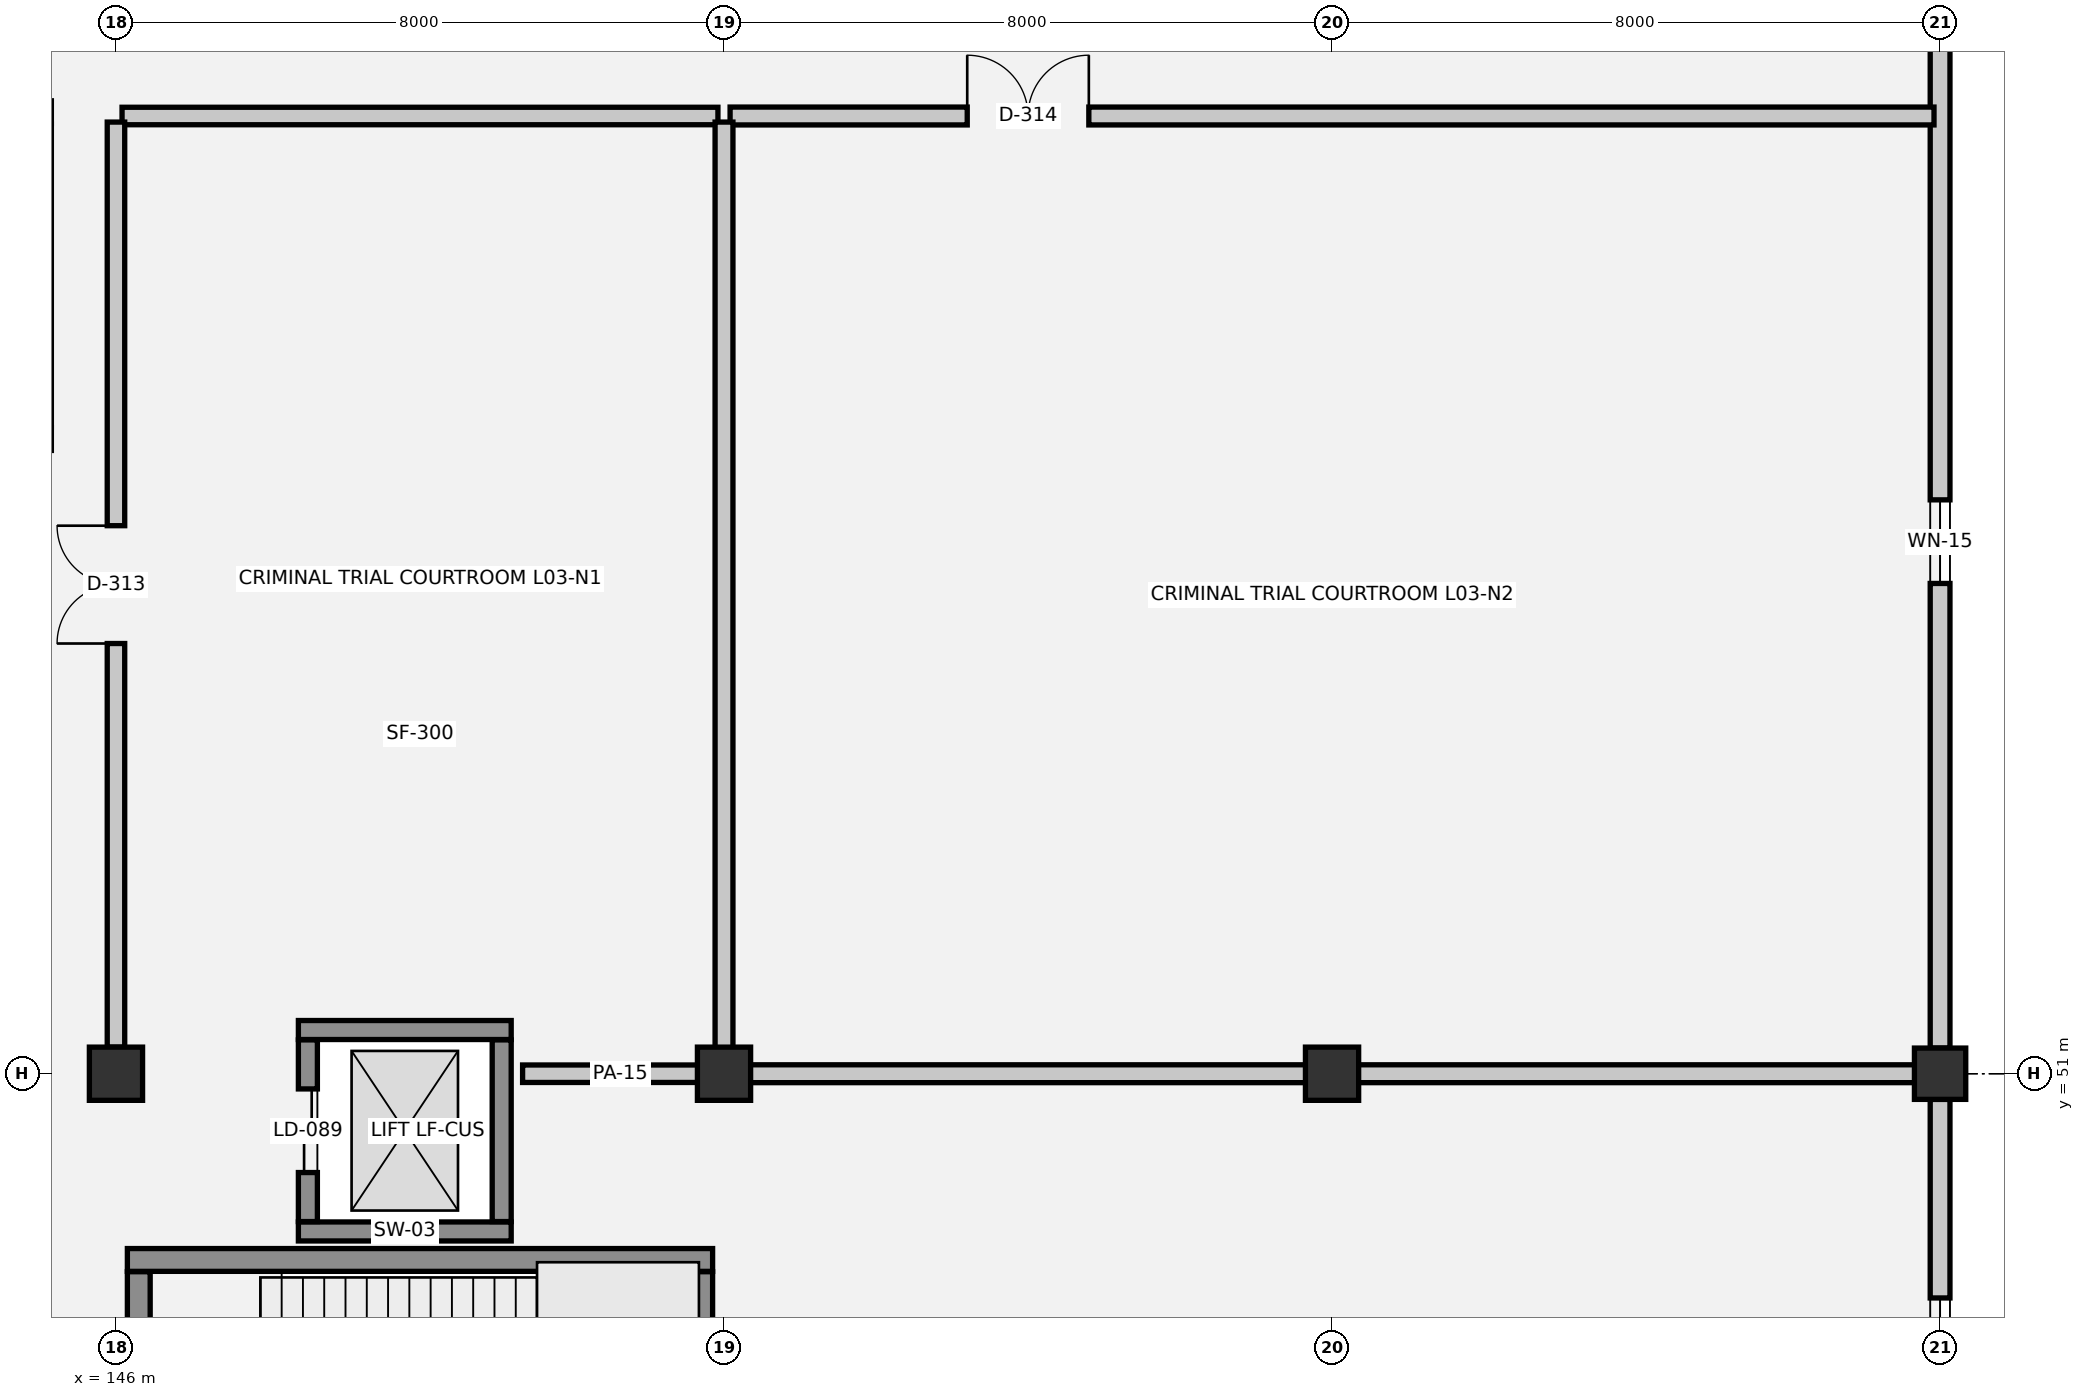
"""IFC4 building model, lengths in metres.
Left out: names, types, materials, properties, quantities, classifications, styles, units other than length and angle.
Written with IfcOpenShell. Run it as: python <this file> out.ifc"""

import sys

from ifc_helpers import new_model, si_unit, direction, frame, frame_2d, origin, origin_2d, place, context, subcontext, project, spatial, rectangle, extrude, element, fill, save


model = new_model("IFC4")
c1 = context("Model", 3, precision=1e-05, world=origin(), true_north=direction((0.0, 1.0)))
c2 = subcontext(c1, "Body", "Model", "MODEL_VIEW")
j1 = project(units=[si_unit("LENGTHUNIT", "METRE"), si_unit("PLANEANGLEUNIT", "RADIAN")], contexts=[c1])
p1 = place(None, origin())
s1 = spatial("IfcSite", under=j1, at=p1, CompositionType="ELEMENT")
p2 = place(p1, origin())
s2 = spatial("IfcBuilding", under=s1, at=p2, CompositionType="ELEMENT")
p3 = place(p2, frame((0.0, 0.0, 9.9)))
s3 = spatial("IfcBuildingStorey", under=s2, at=p3, CompositionType="ELEMENT", Elevation=9.9)
for number, where, z_axis, x_axis in (
    (1, (146.0, 51.0, 0.0), (0.0, 0.0, 1.0), (1.0, 0.0, 0.0)),
    (2, (154.0, 51.0, 0.0), (0.0, 0.0, 1.0), (1.0, 0.0, 0.0)),
    (3, (162.0, 51.0, 0.0), (0.0, 0.0, 1.0), (1.0, 0.0, 0.0)),
):
    element("IfcColumn", number, at=place(p3, frame(where, z_axis=z_axis, x_axis=x_axis)), inside=s3, PredefinedType="COLUMN", context=c2, shape_type="SweptSolid", body=[
        extrude(rectangle(XDim=0.7, YDim=0.7, at=origin_2d()), origin(), (0.0, 0.0, 1.0), 4.5),
    ])
p4 = place(p3, frame((170.0, 51.0, 0.0), z_axis=(0.0, 0.0, 1.0), x_axis=(1.0, 0.0, 0.0)))
e4 = element("IfcColumn", 4, at=p4, inside=s3, PredefinedType="COLUMN", context=c2, shape_type="SweptSolid", body=[
    extrude(rectangle(XDim=0.675, YDim=0.675, at=origin_2d()), origin(), (0.0, 0.0, 1.0), 4.5),
])
p5 = place(p3, frame((170.0, 64.663, 0.0), z_axis=(0.0, 0.0, 1.0), x_axis=(0.0, -1.0, 0.0)))
e5 = element("IfcWall", 5, at=p5, inside=s3, PredefinedType="SOLIDWALL", context=c2, shape_type="SweptSolid", body=[
    extrude(rectangle(XDim=13.325, YDim=0.26, at=frame_2d((6.663, 0.0))), origin(), (0.0, 0.0, 1.0), 3.23),
])
p6 = place(p5, frame((6.113, 0.0, 1.0)))
e6 = element("IfcOpeningElement", 6, at=p6, cuts=e5, PredefinedType="OPENING", context=c2, shape_type="SweptSolid", body=[
    extrude(rectangle(XDim=1.1, YDim=1.2, at=frame_2d((0.55, 0.6))), frame((0.0, 0.14, 0.0), z_axis=(0.0, -1.0, 0.0), x_axis=(1.0, 0.0, 0.0)), (0.0, 0.0, 1.0), 0.28),
])
p7 = place(p3, frame((170.0, 50.663, 0.0), z_axis=(0.0, 0.0, 1.0), x_axis=(0.0, -1.0, 0.0)))
e7 = element("IfcWall", 7, at=p7, inside=s3, PredefinedType="SOLIDWALL", context=c2, shape_type="SweptSolid", body=[
    extrude(rectangle(XDim=6.325, YDim=0.26, at=frame_2d((3.163, 0.0))), origin(), (0.0, 0.0, 1.0), 3.23),
])
p8 = place(p7, frame((2.613, 0.0, 1.0)))
e8 = element("IfcOpeningElement", 8, at=p8, cuts=e7, PredefinedType="OPENING", context=c2, shape_type="SweptSolid", body=[
    extrude(rectangle(XDim=1.1, YDim=1.2, at=frame_2d((0.55, 0.6))), frame((0.0, 0.14, 0.0), z_axis=(0.0, -1.0, 0.0), x_axis=(1.0, 0.0, 0.0)), (0.0, 0.0, 1.0), 0.28),
])
for number, where, z_axis, x_axis in (
    (9, (148.4, 48.925, 0.0), (0.0, 0.0, 1.0), (1.0, 0.0, 0.0)),
    (10, (151.2, 51.575, 0.0), (0.0, 0.0, 1.0), (-1.0, 0.0, 0.0)),
):
    element("IfcWall", number, at=place(p3, frame(where, z_axis=z_axis, x_axis=x_axis)), inside=s3, PredefinedType="SHEAR", context=c2, shape_type="SweptSolid", body=[
        extrude(rectangle(XDim=2.8, YDim=0.25, at=frame_2d((1.4, 0.0))), origin(), (0.0, 0.0, 1.0), 4.5),
    ])
p9 = place(p3, frame((148.525, 51.445, 0.0), z_axis=(0.0, 0.0, 1.0), x_axis=(0.0, -1.0, 0.0)))
e11 = element("IfcWall", 11, at=p9, inside=s3, PredefinedType="SHEAR", context=c2, shape_type="SweptSolid", body=[
    extrude(rectangle(XDim=2.39, YDim=0.25, at=frame_2d((1.195, 0.0))), origin(), (0.0, 0.0, 1.0), 4.5),
])
p10 = place(p9, frame((0.645, 0.0, 0.0)))
e12 = element("IfcOpeningElement", 12, at=p10, cuts=e11, PredefinedType="OPENING", context=c2, shape_type="SweptSolid", body=[
    extrude(rectangle(XDim=1.1, YDim=2.15, at=frame_2d((0.55, 1.075))), frame((0.0, 0.135, 0.0), z_axis=(0.0, -1.0, 0.0), x_axis=(1.0, 0.0, 0.0)), (0.0, 0.0, 1.0), 0.27),
])
p11 = place(p3, frame((151.075, 49.055, 0.0), z_axis=(0.0, 0.0, 1.0), x_axis=(0.0, 1.0, 0.0)))
e13 = element("IfcWall", 13, at=p11, inside=s3, PredefinedType="SHEAR", context=c2, shape_type="SweptSolid", body=[
    extrude(rectangle(XDim=2.39, YDim=0.25, at=frame_2d((1.195, 0.0))), origin(), (0.0, 0.0, 1.0), 4.5),
])
p12 = place(p3, frame((153.85, 48.55, 0.0), z_axis=(0.0, 0.0, 1.0), x_axis=(-1.0, 0.0, 0.0)))
e14 = element("IfcWall", 14, at=p12, inside=s3, PredefinedType="SHEAR", context=c2, shape_type="SweptSolid", body=[
    extrude(rectangle(XDim=7.7, YDim=0.3, at=frame_2d((3.85, 0.0))), origin(), (0.0, 0.0, 1.0), 4.2),
])
p13 = place(p3, frame((146.3, 48.395, 0.0), z_axis=(0.0, 0.0, 1.0), x_axis=(0.0, -1.0, 0.0)))
e15 = element("IfcWall", 15, at=p13, inside=s3, PredefinedType="SHEAR", context=c2, shape_type="SweptSolid", body=[
    extrude(rectangle(XDim=3.99, YDim=0.3, at=frame_2d((1.995, 0.0))), origin(), (0.0, 0.0, 1.0), 4.2),
])
p14 = place(p13, frame((1.37, 0.0, 0.0)))
e16 = element("IfcOpeningElement", 16, at=p14, cuts=e15, PredefinedType="OPENING", context=c2, shape_type="SweptSolid", body=[
    extrude(rectangle(XDim=1.25, YDim=2.15, at=frame_2d((0.625, 1.075))), frame((0.0, 0.16, 0.0), z_axis=(0.0, -1.0, 0.0), x_axis=(1.0, 0.0, 0.0)), (0.0, 0.0, 1.0), 0.32),
])
p15 = place(p3, frame((153.7, 44.405, 0.0), z_axis=(0.0, 0.0, 1.0), x_axis=(0.0, 1.0, 0.0)))
e17 = element("IfcWall", 17, at=p15, inside=s3, PredefinedType="SHEAR", context=c2, shape_type="SweptSolid", body=[
    extrude(rectangle(XDim=3.99, YDim=0.3, at=frame_2d((1.995, 0.0))), origin(), (0.0, 0.0, 1.0), 4.2),
])
p16 = place(p3, frame((151.35, 51.0, 0.0), z_axis=(0.0, 0.0, 1.0), x_axis=(1.0, 0.0, 0.0)))
e18 = element("IfcWall", 18, at=p16, inside=s3, PredefinedType="PARTITIONING", context=c2, shape_type="SweptSolid", body=[
    extrude(rectangle(XDim=2.57, YDim=0.23, at=frame_2d((1.285, 0.0))), origin(), (0.0, 0.0, 1.0), 3.45),
])
p17 = place(p3, frame((154.08, 51.0, 0.0), z_axis=(0.0, 0.0, 1.0), x_axis=(1.0, 0.0, 0.0)))
e19 = element("IfcWall", 19, at=p17, inside=s3, PredefinedType="PARTITIONING", context=c2, shape_type="SweptSolid", body=[
    extrude(rectangle(XDim=15.84, YDim=0.235, at=frame_2d((7.92, 0.0))), origin(), (0.0, 0.0, 1.0), 3.45),
])
p18 = place(p3, frame((146.08, 63.6, 0.0), z_axis=(0.0, 0.0, 1.0), x_axis=(1.0, 0.0, 0.0)))
e20 = element("IfcWall", 20, at=p18, inside=s3, PredefinedType="PARTITIONING", context=c2, shape_type="SweptSolid", body=[
    extrude(rectangle(XDim=7.84, YDim=0.23, at=frame_2d((3.92, 0.0))), origin(), (0.0, 0.0, 1.0), 4.14),
])
p19 = place(p3, frame((154.08, 63.6, 0.0), z_axis=(0.0, 0.0, 1.0), x_axis=(1.0, 0.0, 0.0)))
e21 = element("IfcWall", 21, at=p19, inside=s3, PredefinedType="PARTITIONING", context=c2, shape_type="SweptSolid", body=[
    extrude(rectangle(XDim=15.84, YDim=0.235, at=frame_2d((7.92, 0.0))), origin(), (0.0, 0.0, 1.0), 4.14),
])
p20 = place(p19, frame((3.12, 0.0, 0.0)))
e22 = element("IfcOpeningElement", 22, at=p20, cuts=e21, PredefinedType="OPENING", context=c2, shape_type="SweptSolid", body=[
    extrude(rectangle(XDim=1.6, YDim=2.25, at=frame_2d((0.8, 1.125))), frame((0.0, 0.127, 0.0), z_axis=(0.0, -1.0, 0.0), x_axis=(1.0, 0.0, 0.0)), (0.0, 0.0, 1.0), 0.255),
])
p21 = place(p3, frame((146.0, 51.35, 0.0), z_axis=(0.0, 0.0, 1.0), x_axis=(0.0, 1.0, 0.0)))
e23 = element("IfcWall", 23, at=p21, inside=s3, PredefinedType="PARTITIONING", context=c2, shape_type="SweptSolid", body=[
    extrude(rectangle(XDim=12.17, YDim=0.23, at=frame_2d((6.085, 0.0))), origin(), (0.0, 0.0, 1.0), 3.25),
])
p22 = place(p21, frame((5.31, 0.0, 0.0)))
e24 = element("IfcOpeningElement", 24, at=p22, cuts=e23, PredefinedType="OPENING", context=c2, shape_type="SweptSolid", body=[
    extrude(rectangle(XDim=1.55, YDim=2.25, at=frame_2d((0.775, 1.125))), frame((0.0, 0.125, 0.0), z_axis=(0.0, -1.0, 0.0), x_axis=(1.0, 0.0, 0.0)), (0.0, 0.0, 1.0), 0.25),
])
p23 = place(p3, frame((154.0, 51.08, 0.0), z_axis=(0.0, 0.0, 1.0), x_axis=(0.0, 1.0, 0.0)))
e25 = element("IfcWall", 25, at=p23, inside=s3, PredefinedType="PARTITIONING", context=c2, shape_type="SweptSolid", body=[
    extrude(rectangle(XDim=12.44, YDim=0.235, at=frame_2d((6.22, 0.0))), origin(), (0.0, 0.0, 1.0), 3.25),
])
p24 = place(p6, origin())
e26 = element("IfcWindow", 26, at=p24, inside=s3, PartitioningType="SINGLE_PANEL", PredefinedType="WINDOW", context=c2, shape_type="SweptSolid", body=[
    extrude(rectangle(XDim=1.1, YDim=1.2, at=frame_2d((0.55, 0.6))), frame((0.0, 0.03, 0.0), z_axis=(0.0, -1.0, 0.0), x_axis=(1.0, 0.0, 0.0)), (0.0, 0.0, 1.0), 0.06),
])
fill(e6, e26)
p25 = place(p8, origin())
e27 = element("IfcWindow", 27, at=p25, inside=s3, PartitioningType="SINGLE_PANEL", PredefinedType="WINDOW", context=c2, shape_type="SweptSolid", body=[
    extrude(rectangle(XDim=1.1, YDim=1.2, at=frame_2d((0.55, 0.6))), frame((0.0, 0.03, 0.0), z_axis=(0.0, -1.0, 0.0), x_axis=(1.0, 0.0, 0.0)), (0.0, 0.0, 1.0), 0.06),
])
fill(e8, e27)
p26 = place(p10, origin())
e28 = element("IfcDoor", 28, at=p26, inside=s3, OperationType="DOUBLE_DOOR_SLIDING", PredefinedType="DOOR", context=c2, shape_type="SweptSolid", body=[
    extrude(rectangle(XDim=1.1, YDim=2.15, at=frame_2d((0.55, 1.075))), frame((0.0, 0.025, 0.0), z_axis=(0.0, -1.0, 0.0), x_axis=(1.0, 0.0, 0.0)), (0.0, 0.0, 1.0), 0.05),
])
fill(e12, e28)
p27 = place(p22, origin())
e29 = element("IfcDoor", 29, at=p27, inside=s3, OperationType="DOUBLE_DOOR_SINGLE_SWING", PredefinedType="DOOR", context=c2, shape_type="SweptSolid", body=[
    extrude(rectangle(XDim=1.55, YDim=2.25, at=frame_2d((0.775, 1.125))), frame((0.0, 0.025, 0.0), z_axis=(0.0, -1.0, 0.0), x_axis=(1.0, 0.0, 0.0)), (0.0, 0.0, 1.0), 0.05),
])
fill(e24, e29)
p28 = place(p20, origin())
e30 = element("IfcDoor", 30, at=p28, inside=s3, OperationType="DOUBLE_DOOR_SINGLE_SWING", PredefinedType="DOOR", context=c2, shape_type="SweptSolid", body=[
    extrude(rectangle(XDim=1.6, YDim=2.25, at=frame_2d((0.8, 1.125))), frame((0.0, 0.025, 0.0), z_axis=(0.0, -1.0, 0.0), x_axis=(1.0, 0.0, 0.0)), (0.0, 0.0, 1.0), 0.05),
])
fill(e22, e30)
save(model, sys.argv[1])
